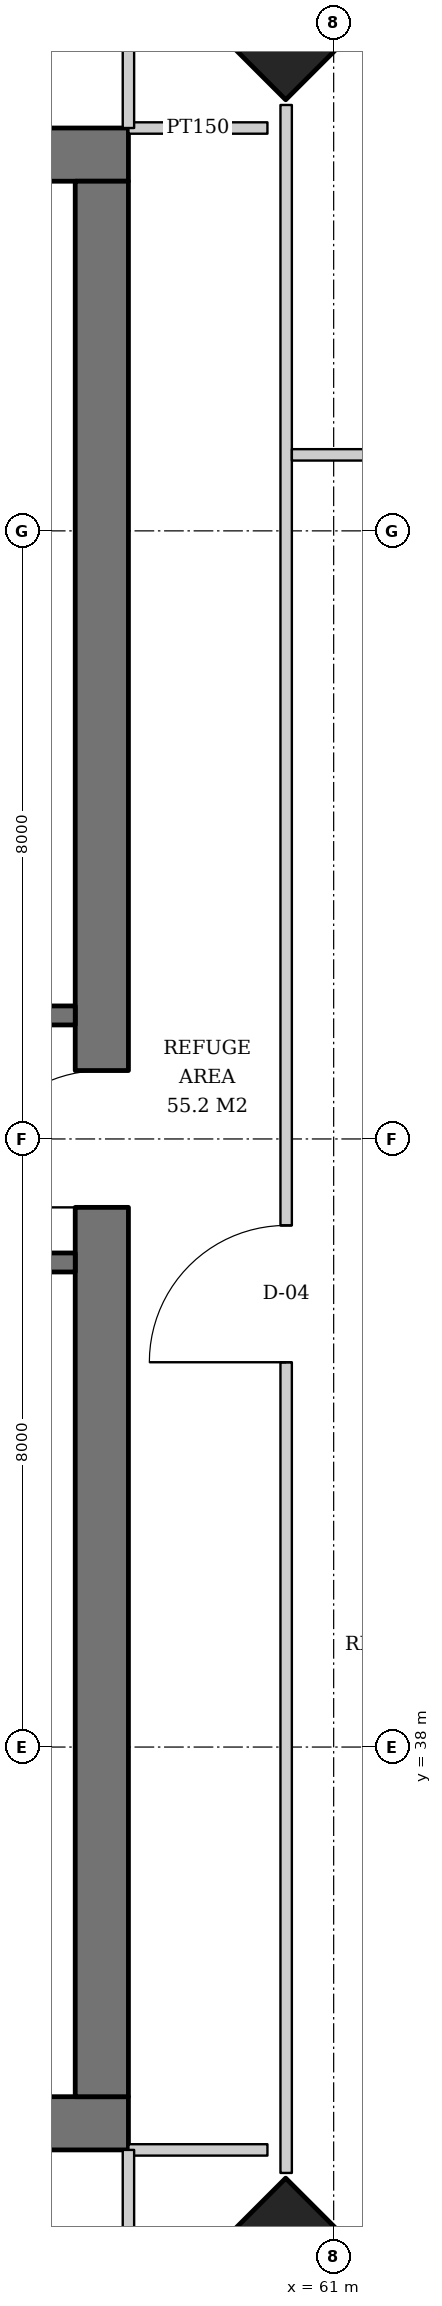
"""IFC4 building model, lengths in metres.
Left out: names, types, materials, properties, quantities, classifications, styles, units other than length and angle.
Written with IfcOpenShell. Run it as: python <this file> out.ifc"""

import sys

from ifc_helpers import new_model, si_unit, direction, frame, frame_2d, origin, origin_2d, place, context, subcontext, project, spatial, rectangle, extrude, element, fill, save


model = new_model("IFC4")
c1 = context("Model", 3, precision=1e-05, world=origin(), true_north=direction((0.0, 1.0)))
c2 = subcontext(c1, "Body", "Model", "MODEL_VIEW")
j1 = project(units=[si_unit("LENGTHUNIT", "METRE"), si_unit("PLANEANGLEUNIT", "RADIAN")], contexts=[c1])
p1 = place(None, origin())
s1 = spatial("IfcSite", under=j1, at=p1, CompositionType="ELEMENT")
p2 = place(p1, origin())
s2 = spatial("IfcBuilding", under=s1, at=p2, CompositionType="ELEMENT")
p3 = place(p2, frame((0.0, 0.0, 161.6)))
s3 = spatial("IfcBuildingStorey", under=s2, at=p3, CompositionType="ELEMENT", Elevation=161.6)
for number, where, z_axis, x_axis in (
    (1, (60.407, 61.407, 0.0), (-0.032, -0.032, 0.999), (0.707, -0.707, 0.0)),
    (2, (60.407, 30.593, 0.0), (-0.032, 0.032, 0.999), (-0.707, -0.707, 0.0)),
):
    element("IfcColumn", number, at=place(p3, frame(where, z_axis=z_axis, x_axis=x_axis)), inside=s3, PredefinedType="COLUMN", context=c2, shape_type="SweptSolid", body=[
        extrude(rectangle(XDim=2.4, YDim=2.4, at=origin_2d()), origin(), (0.0, 0.0, 1.0), 3.804),
    ])
p4 = place(p3, frame((31.7, 33.05, 0.0), z_axis=(0.0, 0.0, 1.0), x_axis=(1.0, 0.0, 0.0)))
e3 = element("IfcWall", 3, at=p4, inside=s3, PredefinedType="SHEAR", context=c2, shape_type="SweptSolid", body=[
    extrude(rectangle(XDim=26.6, YDim=0.7, at=frame_2d((13.3, 0.0))), origin(), (0.0, 0.0, 1.0), 3.8),
])
p5 = place(p4, frame((7.3, 0.0, 0.0)))
e4 = element("IfcOpeningElement", 4, at=p5, cuts=e3, PredefinedType="OPENING", context=c2, shape_type="SweptSolid", body=[
    extrude(rectangle(XDim=1.0, YDim=2.1, at=frame_2d((0.5, 1.05))), frame((0.0, 0.36, 0.0), z_axis=(0.0, -1.0, 0.0), x_axis=(1.0, 0.0, 0.0)), (0.0, 0.0, 1.0), 0.72),
])
p6 = place(p4, frame((18.75, 0.0, 0.0)))
e5 = element("IfcOpeningElement", 5, at=p6, cuts=e3, PredefinedType="OPENING", context=c2, shape_type="SweptSolid", body=[
    extrude(rectangle(XDim=1.0, YDim=2.1, at=frame_2d((0.5, 1.05))), frame((0.0, 0.36, 0.0), z_axis=(0.0, -1.0, 0.0), x_axis=(1.0, 0.0, 0.0)), (0.0, 0.0, 1.0), 0.72),
])
p7 = place(p4, frame((3.2, 0.0, 0.0)))
e6 = element("IfcOpeningElement", 6, at=p7, cuts=e3, PredefinedType="OPENING", context=c2, shape_type="SweptSolid", body=[
    extrude(rectangle(XDim=1.0, YDim=2.1, at=frame_2d((0.5, 1.05))), frame((0.0, 0.36, 0.0), z_axis=(0.0, -1.0, 0.0), x_axis=(1.0, 0.0, 0.0)), (0.0, 0.0, 1.0), 0.72),
])
p8 = place(p3, frame((31.7, 58.95, 0.0), z_axis=(0.0, 0.0, 1.0), x_axis=(1.0, 0.0, 0.0)))
e7 = element("IfcWall", 7, at=p8, inside=s3, PredefinedType="SHEAR", context=c2, shape_type="SweptSolid", body=[
    extrude(rectangle(XDim=26.6, YDim=0.7, at=frame_2d((13.3, 0.0))), origin(), (0.0, 0.0, 1.0), 3.8),
])
p9 = place(p8, frame((17.94, 0.0, 0.0)))
e8 = element("IfcOpeningElement", 8, at=p9, cuts=e7, PredefinedType="OPENING", context=c2, shape_type="SweptSolid", body=[
    extrude(rectangle(XDim=1.0, YDim=2.1, at=frame_2d((0.5, 1.05))), frame((0.0, 0.36, 0.0), z_axis=(0.0, -1.0, 0.0), x_axis=(1.0, 0.0, 0.0)), (0.0, 0.0, 1.0), 0.72),
])
p10 = place(p8, frame((5.825, 0.0, 0.0)))
e9 = element("IfcOpeningElement", 9, at=p10, cuts=e7, PredefinedType="OPENING", context=c2, shape_type="SweptSolid", body=[
    extrude(rectangle(XDim=1.0, YDim=2.1, at=frame_2d((0.5, 1.05))), frame((0.0, 0.36, 0.0), z_axis=(0.0, -1.0, 0.0), x_axis=(1.0, 0.0, 0.0)), (0.0, 0.0, 1.0), 0.72),
])
p11 = place(p8, frame((1.837, 0.0, 0.0)))
e10 = element("IfcOpeningElement", 10, at=p11, cuts=e7, PredefinedType="OPENING", context=c2, shape_type="SweptSolid", body=[
    extrude(rectangle(XDim=1.0, YDim=2.1, at=frame_2d((0.5, 1.05))), frame((0.0, 0.36, 0.0), z_axis=(0.0, -1.0, 0.0), x_axis=(1.0, 0.0, 0.0)), (0.0, 0.0, 1.0), 0.72),
])
p12 = place(p8, frame((3.781, 0.0, 0.0)))
e11 = element("IfcOpeningElement", 11, at=p12, cuts=e7, PredefinedType="OPENING", context=c2, shape_type="SweptSolid", body=[
    extrude(rectangle(XDim=1.0, YDim=2.1, at=frame_2d((0.5, 1.05))), frame((0.0, 0.36, 0.0), z_axis=(0.0, -1.0, 0.0), x_axis=(1.0, 0.0, 0.0)), (0.0, 0.0, 1.0), 0.72),
])
p13 = place(p3, frame((57.95, 33.4, 0.0), z_axis=(0.0, 0.0, 1.0), x_axis=(0.0, 1.0, 0.0)))
e12 = element("IfcWall", 12, at=p13, inside=s3, PredefinedType="SHEAR", context=c2, shape_type="SweptSolid", body=[
    extrude(rectangle(XDim=25.2, YDim=0.7, at=frame_2d((12.6, 0.0))), origin(), (0.0, 0.0, 1.0), 3.8),
])
p14 = place(p13, frame((11.7, 0.0, 0.0)))
e13 = element("IfcOpeningElement", 13, at=p14, cuts=e12, PredefinedType="OPENING", context=c2, shape_type="SweptSolid", body=[
    extrude(rectangle(XDim=1.8, YDim=2.4, at=frame_2d((0.9, 1.2))), frame((0.0, 0.36, 0.0), z_axis=(0.0, -1.0, 0.0), x_axis=(1.0, 0.0, 0.0)), (0.0, 0.0, 1.0), 0.72),
])
p15 = place(p3, frame((54.9, 44.375, 0.0), z_axis=(0.0, 0.0, 1.0), x_axis=(1.0, 0.0, 0.0)))
e14 = element("IfcWall", 14, at=p15, inside=s3, PredefinedType="SOLIDWALL", context=c2, shape_type="SweptSolid", body=[
    extrude(rectangle(XDim=2.7, YDim=0.25, at=frame_2d((1.35, 0.0))), origin(), (0.0, 0.0, 1.0), 3.2),
])
p16 = place(p15, frame((0.85, 0.0, 0.0)))
e15 = element("IfcOpeningElement", 15, at=p16, cuts=e14, PredefinedType="OPENING", context=c2, shape_type="SweptSolid", body=[
    extrude(rectangle(XDim=1.0, YDim=2.1, at=frame_2d((0.5, 1.05))), frame((0.0, 0.135, 0.0), z_axis=(0.0, -1.0, 0.0), x_axis=(1.0, 0.0, 0.0)), (0.0, 0.0, 1.0), 0.27),
])
p17 = place(p3, frame((54.9, 47.625, 0.0), z_axis=(0.0, 0.0, 1.0), x_axis=(1.0, 0.0, 0.0)))
e16 = element("IfcWall", 16, at=p17, inside=s3, PredefinedType="SOLIDWALL", context=c2, shape_type="SweptSolid", body=[
    extrude(rectangle(XDim=2.7, YDim=0.25, at=frame_2d((1.35, 0.0))), origin(), (0.0, 0.0, 1.0), 3.2),
])
p18 = place(p17, frame((0.85, 0.0, 0.0)))
e17 = element("IfcOpeningElement", 17, at=p18, cuts=e16, PredefinedType="OPENING", context=c2, shape_type="SweptSolid", body=[
    extrude(rectangle(XDim=1.0, YDim=2.1, at=frame_2d((0.5, 1.05))), frame((0.0, 0.135, 0.0), z_axis=(0.0, -1.0, 0.0), x_axis=(1.0, 0.0, 0.0)), (0.0, 0.0, 1.0), 0.27),
])
for number, where, z_axis, x_axis in (
    (18, (58.3, 59.3, 0.0), (0.0, 0.0, 1.0), (1.0, 0.0, 0.0)),
    (19, (58.3, 32.7, 0.0), (0.0, 0.0, 1.0), (1.0, 0.0, 0.0)),
):
    element("IfcWall", number, at=place(p3, frame(where, z_axis=z_axis, x_axis=x_axis)), inside=s3, PredefinedType="PARTITIONING", context=c2, shape_type="SweptSolid", body=[
        extrude(rectangle(XDim=1.829, YDim=0.15, at=frame_2d((0.915, 0.0))), origin(), (0.0, 0.0, 1.0), 3.6),
    ])
p19 = place(p3, frame((60.375, 32.397, 0.0), z_axis=(0.0, 0.0, 1.0), x_axis=(0.0, 1.0, 0.0)))
e20 = element("IfcWall", 20, at=p19, inside=s3, PredefinedType="PARTITIONING", context=c2, shape_type="SweptSolid", body=[
    extrude(rectangle(XDim=27.206, YDim=0.15, at=frame_2d((13.603, 0.0))), origin(), (0.0, 0.0, 1.0), 2.83),
])
p20 = place(p19, frame((10.666, 0.0, 0.0)))
e21 = element("IfcOpeningElement", 21, at=p20, cuts=e20, PredefinedType="OPENING", context=c2, shape_type="SweptSolid", body=[
    extrude(rectangle(XDim=1.8, YDim=2.4, at=frame_2d((0.9, 1.2))), frame((0.0, 0.085, 0.0), z_axis=(0.0, -1.0, 0.0), x_axis=(1.0, 0.0, 0.0)), (0.0, 0.0, 1.0), 0.17),
])
p21 = place(p3, frame((60.45, 55.0, 0.0), z_axis=(0.0, 0.0, 1.0), x_axis=(1.0, 0.0, 0.0)))
e22 = element("IfcWall", 22, at=p21, inside=s3, PredefinedType="PARTITIONING", context=c2, shape_type="SweptSolid", body=[
    extrude(rectangle(XDim=5.59, YDim=0.15, at=frame_2d((2.795, 0.0))), origin(), (0.0, 0.0, 1.0), 3.6),
])
for number, where, z_axis, x_axis in (
    (23, (58.3, 59.3, 0.0), (0.0, 0.0, 1.0), (0.0, 1.0, 0.0)),
    (24, (58.3, 32.7, 0.0), (0.0, 0.0, 1.0), (0.0, -1.0, 0.0)),
):
    element("IfcWall", number, at=place(p3, frame(where, z_axis=z_axis, x_axis=x_axis)), inside=s3, PredefinedType="PARTITIONING", context=c2, shape_type="SweptSolid", body=[
        extrude(rectangle(XDim=1.829, YDim=0.15, at=frame_2d((0.915, 0.0))), origin(), (0.0, 0.0, 1.0), 3.6),
    ])
p22 = place(p14, origin())
e25 = element("IfcDoor", 25, at=p22, inside=s3, OperationType="DOUBLE_DOOR_SINGLE_SWING", PredefinedType="DOOR", context=c2, shape_type="SweptSolid", body=[
    extrude(rectangle(XDim=1.8, YDim=2.4, at=frame_2d((0.9, 1.2))), frame((0.0, 0.025, 0.0), z_axis=(0.0, -1.0, 0.0), x_axis=(1.0, 0.0, 0.0)), (0.0, 0.0, 1.0), 0.05),
])
fill(e13, e25)
p23 = place(p20, origin())
e26 = element("IfcDoor", 26, at=p23, inside=s3, OperationType="DOUBLE_DOOR_SINGLE_SWING", PredefinedType="DOOR", context=c2, shape_type="SweptSolid", body=[
    extrude(rectangle(XDim=1.8, YDim=2.4, at=frame_2d((0.9, 1.2))), frame((0.0, 0.025, 0.0), z_axis=(0.0, -1.0, 0.0), x_axis=(1.0, 0.0, 0.0)), (0.0, 0.0, 1.0), 0.05),
])
fill(e21, e26)
save(model, sys.argv[1])
